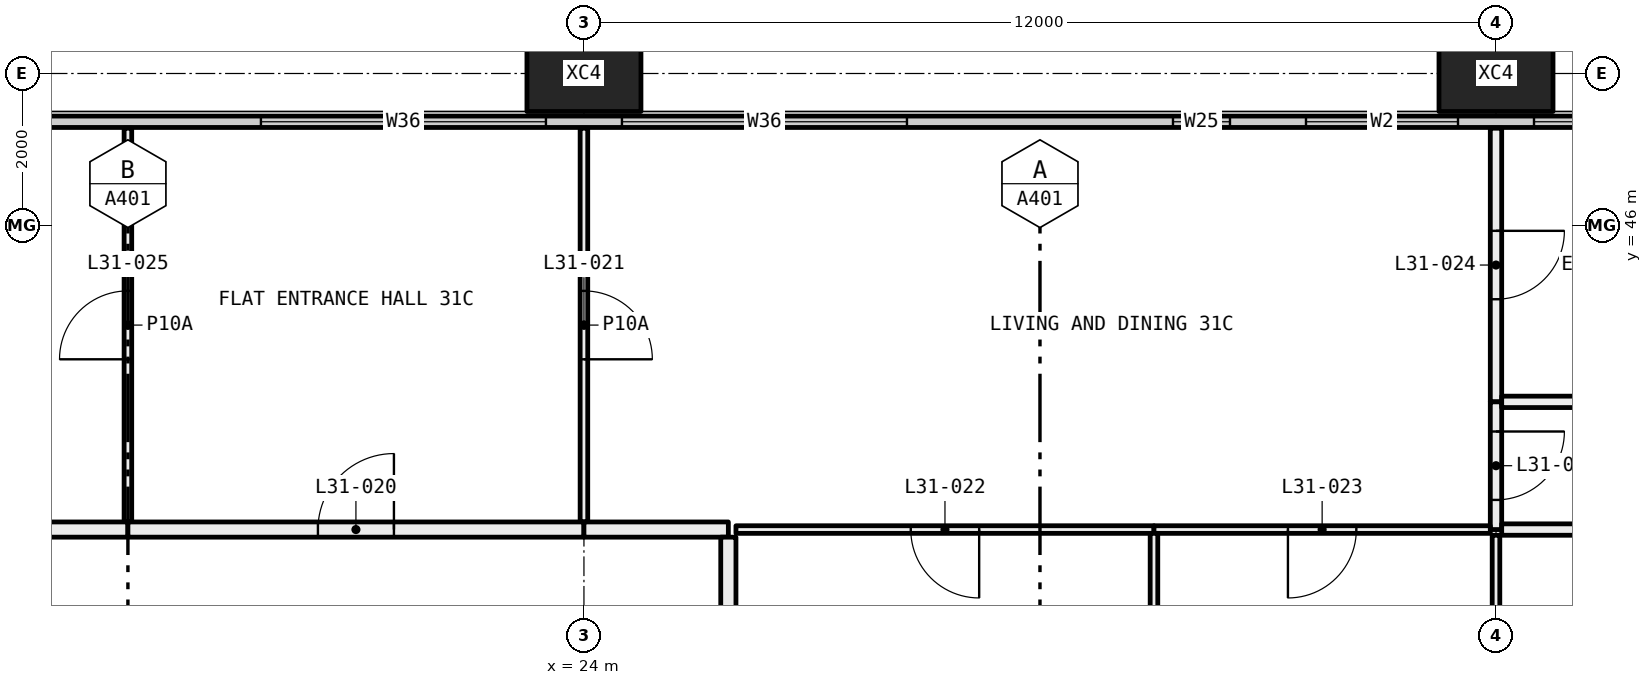
"""IFC4 building model, lengths in metres.
Left out: names, types, materials, properties, quantities, classifications, styles, units other than length and angle.
Written with IfcOpenShell. Run it as: python <this file> out.ifc"""

import sys

from ifc_helpers import new_model, si_unit, direction, frame, frame_2d, origin, origin_2d, place, context, subcontext, project, spatial, rectangle, hollow_rectangle, extrude, element, fill, save


model = new_model("IFC4")
c1 = context("Model", 3, precision=1e-05, world=origin(), true_north=direction((0.0, 1.0)))
c2 = subcontext(c1, "Body", "Model", "MODEL_VIEW")
j1 = project(units=[si_unit("LENGTHUNIT", "METRE"), si_unit("PLANEANGLEUNIT", "RADIAN")], contexts=[c1])
p1 = place(None, origin())
s1 = spatial("IfcSite", under=j1, at=p1, CompositionType="ELEMENT")
p2 = place(p1, origin())
s2 = spatial("IfcBuilding", under=s1, at=p2, CompositionType="ELEMENT")
p3 = place(p2, frame((0.0, 0.0, 120.75)))
s3 = spatial("IfcBuildingStorey", under=s2, at=p3, CompositionType="ELEMENT", Elevation=120.75)
for number, where, z_axis, x_axis in (
    (1, (24.0, 48.0, -0.4), (0.0, 0.0, 1.0), (1.0, 0.0, 0.0)),
    (2, (36.0, 48.0, -0.4), (0.0, 0.0, 1.0), (1.0, 0.0, 0.0)),
):
    element("IfcColumn", number, at=place(p3, frame(where, z_axis=z_axis, x_axis=x_axis)), inside=s3, PredefinedType="COLUMN", context=c2, shape_type="SweptSolid", body=[
        extrude(hollow_rectangle(XDim=1.5, YDim=1.0, WallThickness=0.06, at=origin_2d()), origin(), (0.0, 0.0, 1.0), 3.45),
    ])
p4 = place(p3, frame((6.56, 47.365, 0.0), z_axis=(0.0, 0.0, 1.0), x_axis=(1.0, 0.0, 0.0)))
e3 = element("IfcWall", 3, at=p4, inside=s3, PredefinedType="ELEMENTEDWALL", context=c2, shape_type="SweptSolid", body=[
    extrude(rectangle(XDim=58.88, YDim=0.15, at=frame_2d((29.44, 0.0))), origin(), (0.0, 0.0, 1.0), 3.05),
])
p5 = place(p4, frame((0.44, 0.0, 0.45)))
e4 = element("IfcOpeningElement", 4, at=p5, cuts=e3, PredefinedType="OPENING", context=c2, shape_type="SweptSolid", body=[
    extrude(rectangle(XDim=4.5, YDim=2.55, at=frame_2d((2.25, 1.275))), frame((0.0, 0.085, 0.0), z_axis=(0.0, -1.0, 0.0), x_axis=(1.0, 0.0, 0.0)), (0.0, 0.0, 1.0), 0.17),
])
p6 = place(p4, frame((5.94, 0.0, 0.45)))
e5 = element("IfcOpeningElement", 5, at=p6, cuts=e3, PredefinedType="OPENING", context=c2, shape_type="SweptSolid", body=[
    extrude(rectangle(XDim=3.75, YDim=2.55, at=frame_2d((1.875, 1.275))), frame((0.0, 0.085, 0.0), z_axis=(0.0, -1.0, 0.0), x_axis=(1.0, 0.0, 0.0)), (0.0, 0.0, 1.0), 0.17),
])
p7 = place(p4, frame((13.19, 0.0, 0.45)))
e6 = element("IfcOpeningElement", 6, at=p7, cuts=e3, PredefinedType="OPENING", context=c2, shape_type="SweptSolid", body=[
    extrude(rectangle(XDim=3.75, YDim=2.55, at=frame_2d((1.875, 1.275))), frame((0.0, 0.085, 0.0), z_axis=(0.0, -1.0, 0.0), x_axis=(1.0, 0.0, 0.0)), (0.0, 0.0, 1.0), 0.17),
])
p8 = place(p4, frame((17.94, 0.0, 0.45)))
e7 = element("IfcOpeningElement", 7, at=p8, cuts=e3, PredefinedType="OPENING", context=c2, shape_type="SweptSolid", body=[
    extrude(rectangle(XDim=3.75, YDim=2.55, at=frame_2d((1.875, 1.275))), frame((0.0, 0.085, 0.0), z_axis=(0.0, -1.0, 0.0), x_axis=(1.0, 0.0, 0.0)), (0.0, 0.0, 1.0), 0.17),
])
p9 = place(p4, frame((25.19, 0.0, 0.45)))
e8 = element("IfcOpeningElement", 8, at=p9, cuts=e3, PredefinedType="OPENING", context=c2, shape_type="SweptSolid", body=[
    extrude(rectangle(XDim=0.75, YDim=2.55, at=frame_2d((0.375, 1.275))), frame((0.0, 0.085, 0.0), z_axis=(0.0, -1.0, 0.0), x_axis=(1.0, 0.0, 0.0)), (0.0, 0.0, 1.0), 0.17),
])
p10 = place(p4, frame((26.94, 0.0, 0.45)))
e9 = element("IfcOpeningElement", 9, at=p10, cuts=e3, PredefinedType="OPENING", context=c2, shape_type="SweptSolid", body=[
    extrude(rectangle(XDim=2.0, YDim=2.55, at=frame_2d((1.0, 1.275))), frame((0.0, 0.085, 0.0), z_axis=(0.0, -1.0, 0.0), x_axis=(1.0, 0.0, 0.0)), (0.0, 0.0, 1.0), 0.17),
])
p11 = place(p4, frame((29.94, 0.0, 0.45)))
e10 = element("IfcOpeningElement", 10, at=p11, cuts=e3, PredefinedType="OPENING", context=c2, shape_type="SweptSolid", body=[
    extrude(rectangle(XDim=3.75, YDim=2.55, at=frame_2d((1.875, 1.275))), frame((0.0, 0.085, 0.0), z_axis=(0.0, -1.0, 0.0), x_axis=(1.0, 0.0, 0.0)), (0.0, 0.0, 1.0), 0.17),
])
p12 = place(p4, frame((37.19, 0.0, 0.45)))
e11 = element("IfcOpeningElement", 11, at=p12, cuts=e3, PredefinedType="OPENING", context=c2, shape_type="SweptSolid", body=[
    extrude(rectangle(XDim=3.75, YDim=2.55, at=frame_2d((1.875, 1.275))), frame((0.0, 0.085, 0.0), z_axis=(0.0, -1.0, 0.0), x_axis=(1.0, 0.0, 0.0)), (0.0, 0.0, 1.0), 0.17),
])
p13 = place(p4, frame((41.94, 0.0, 0.45)))
e12 = element("IfcOpeningElement", 12, at=p13, cuts=e3, PredefinedType="OPENING", context=c2, shape_type="SweptSolid", body=[
    extrude(rectangle(XDim=3.75, YDim=2.55, at=frame_2d((1.875, 1.275))), frame((0.0, 0.085, 0.0), z_axis=(0.0, -1.0, 0.0), x_axis=(1.0, 0.0, 0.0)), (0.0, 0.0, 1.0), 0.17),
])
p14 = place(p4, frame((49.19, 0.0, 0.45)))
e13 = element("IfcOpeningElement", 13, at=p14, cuts=e3, PredefinedType="OPENING", context=c2, shape_type="SweptSolid", body=[
    extrude(rectangle(XDim=0.75, YDim=2.55, at=frame_2d((0.375, 1.275))), frame((0.0, 0.085, 0.0), z_axis=(0.0, -1.0, 0.0), x_axis=(1.0, 0.0, 0.0)), (0.0, 0.0, 1.0), 0.17),
])
p15 = place(p4, frame((50.94, 0.0, 0.45)))
e14 = element("IfcOpeningElement", 14, at=p15, cuts=e3, PredefinedType="OPENING", context=c2, shape_type="SweptSolid", body=[
    extrude(rectangle(XDim=2.0, YDim=2.55, at=frame_2d((1.0, 1.275))), frame((0.0, 0.085, 0.0), z_axis=(0.0, -1.0, 0.0), x_axis=(1.0, 0.0, 0.0)), (0.0, 0.0, 1.0), 0.17),
])
p16 = place(p4, frame((53.94, 0.0, 0.45)))
e15 = element("IfcOpeningElement", 15, at=p16, cuts=e3, PredefinedType="OPENING", context=c2, shape_type="SweptSolid", body=[
    extrude(rectangle(XDim=4.5, YDim=2.55, at=frame_2d((2.25, 1.275))), frame((0.0, 0.085, 0.0), z_axis=(0.0, -1.0, 0.0), x_axis=(1.0, 0.0, 0.0)), (0.0, 0.0, 1.0), 0.17),
])
p17 = place(p3, frame((18.0, 42.1, 0.0), z_axis=(0.0, 0.0, 1.0), x_axis=(0.0, 1.0, 0.0)))
e16 = element("IfcWall", 16, at=p17, inside=s3, PredefinedType="PARTITIONING", context=c2, shape_type="SweptSolid", body=[
    extrude(rectangle(XDim=5.18, YDim=0.1, at=frame_2d((2.59, 0.0))), origin(), (0.0, 0.0, 1.0), 3.05),
])
p18 = place(p17, frame((2.14, 0.0, 0.0)))
e17 = element("IfcOpeningElement", 17, at=p18, cuts=e16, PredefinedType="OPENING", context=c2, shape_type="SweptSolid", body=[
    extrude(rectangle(XDim=0.9, YDim=2.1, at=frame_2d((0.45, 1.05))), frame((0.0, 0.06, 0.0), z_axis=(0.0, -1.0, 0.0), x_axis=(1.0, 0.0, 0.0)), (0.0, 0.0, 1.0), 0.12),
])
p19 = place(p3, frame((12.0, 42.0, 0.0), z_axis=(0.0, 0.0, 1.0), x_axis=(1.0, 0.0, 0.0)))
e18 = element("IfcWall", 18, at=p19, inside=s3, PredefinedType="PARTITIONING", context=c2, shape_type="SweptSolid", body=[
    extrude(rectangle(XDim=6.0, YDim=0.2, at=frame_2d((3.0, 0.0))), origin(), (0.0, 0.0, 1.0), 3.05),
])
p20 = place(p3, frame((24.0, 42.1, 0.0), z_axis=(0.0, 0.0, 1.0), x_axis=(0.0, 1.0, 0.0)))
e19 = element("IfcWall", 19, at=p20, inside=s3, PredefinedType="PARTITIONING", context=c2, shape_type="SweptSolid", body=[
    extrude(rectangle(XDim=5.18, YDim=0.1, at=frame_2d((2.59, 0.0))), origin(), (0.0, 0.0, 1.0), 3.05),
])
p21 = place(p20, frame((2.14, 0.0, 0.0)))
e20 = element("IfcOpeningElement", 20, at=p21, cuts=e19, PredefinedType="OPENING", context=c2, shape_type="SweptSolid", body=[
    extrude(rectangle(XDim=0.9, YDim=2.1, at=frame_2d((0.45, 1.05))), frame((0.0, 0.06, 0.0), z_axis=(0.0, -1.0, 0.0), x_axis=(1.0, 0.0, 0.0)), (0.0, 0.0, 1.0), 0.12),
])
p22 = place(p3, frame((18.0, 42.0, 0.0), z_axis=(0.0, 0.0, 1.0), x_axis=(1.0, 0.0, 0.0)))
e21 = element("IfcWall", 21, at=p22, inside=s3, PredefinedType="PARTITIONING", context=c2, shape_type="SweptSolid", body=[
    extrude(rectangle(XDim=6.0, YDim=0.2, at=frame_2d((3.0, 0.0))), origin(), (0.0, 0.0, 1.0), 3.05),
])
p23 = place(p22, frame((2.5, 0.0, 0.0)))
e22 = element("IfcOpeningElement", 22, at=p23, cuts=e21, PredefinedType="OPENING", context=c2, shape_type="SweptSolid", body=[
    extrude(rectangle(XDim=1.0, YDim=2.1, at=frame_2d((0.5, 1.05))), frame((0.0, 0.11, 0.0), z_axis=(0.0, -1.0, 0.0), x_axis=(1.0, 0.0, 0.0)), (0.0, 0.0, 1.0), 0.22),
])
p24 = place(p3, frame((36.0, 43.68, 0.0), z_axis=(0.0, 0.0, 1.0), x_axis=(0.0, 1.0, 0.0)))
e23 = element("IfcWall", 23, at=p24, inside=s3, PredefinedType="PARTITIONING", context=c2, shape_type="SweptSolid", body=[
    extrude(rectangle(XDim=3.6, YDim=0.15, at=frame_2d((1.8, 0.0))), origin(), (0.0, 0.0, 1.0), 2.45),
])
p25 = place(p24, frame((1.35, 0.0, 0.0)))
e24 = element("IfcOpeningElement", 24, at=p25, cuts=e23, PredefinedType="OPENING", context=c2, shape_type="SweptSolid", body=[
    extrude(rectangle(XDim=0.9, YDim=2.1, at=frame_2d((0.45, 1.05))), frame((0.0, 0.085, 0.0), z_axis=(0.0, -1.0, 0.0), x_axis=(1.0, 0.0, 0.0)), (0.0, 0.0, 1.0), 0.17),
])
p26 = place(p3, frame((36.0, 42.0, 0.0), z_axis=(0.0, 0.0, 1.0), x_axis=(0.0, 1.0, 0.0)))
e25 = element("IfcWall", 25, at=p26, inside=s3, PredefinedType="PARTITIONING", context=c2, shape_type="SweptSolid", body=[
    extrude(rectangle(XDim=1.68, YDim=0.15, at=frame_2d((0.84, 0.0))), origin(), (0.0, 0.0, 1.0), 2.45),
])
p27 = place(p26, frame((0.39, 0.0, 0.0)))
e26 = element("IfcOpeningElement", 26, at=p27, cuts=e25, PredefinedType="OPENING", context=c2, shape_type="SweptSolid", body=[
    extrude(rectangle(XDim=0.9, YDim=2.1, at=frame_2d((0.45, 1.05))), frame((0.0, 0.085, 0.0), z_axis=(0.0, -1.0, 0.0), x_axis=(1.0, 0.0, 0.0)), (0.0, 0.0, 1.0), 0.17),
])
p28 = place(p3, frame((26.0, 42.0, 0.0), z_axis=(0.0, 0.0, 1.0), x_axis=(1.0, 0.0, 0.0)))
e27 = element("IfcWall", 27, at=p28, inside=s3, PredefinedType="PARTITIONING", context=c2, shape_type="SweptSolid", body=[
    extrude(rectangle(XDim=5.5, YDim=0.1, at=frame_2d((2.75, 0.0))), origin(), (0.0, 0.0, 1.0), 3.05),
])
p29 = place(p28, frame((2.3, 0.0, 0.0)))
e28 = element("IfcOpeningElement", 28, at=p29, cuts=e27, PredefinedType="OPENING", context=c2, shape_type="SweptSolid", body=[
    extrude(rectangle(XDim=0.9, YDim=2.1, at=frame_2d((0.45, 1.05))), frame((0.0, 0.06, 0.0), z_axis=(0.0, -1.0, 0.0), x_axis=(1.0, 0.0, 0.0)), (0.0, 0.0, 1.0), 0.12),
])
p30 = place(p3, frame((31.5, 42.0, 0.0), z_axis=(0.0, 0.0, 1.0), x_axis=(1.0, 0.0, 0.0)))
e29 = element("IfcWall", 29, at=p30, inside=s3, PredefinedType="PARTITIONING", context=c2, shape_type="SweptSolid", body=[
    extrude(rectangle(XDim=4.425, YDim=0.1, at=frame_2d((2.212, 0.0))), origin(), (0.0, 0.0, 1.0), 2.45),
])
p31 = place(p30, frame((1.762, 0.0, 0.0)))
e30 = element("IfcOpeningElement", 30, at=p31, cuts=e29, PredefinedType="OPENING", context=c2, shape_type="SweptSolid", body=[
    extrude(rectangle(XDim=0.9, YDim=2.1, at=frame_2d((0.45, 1.05))), frame((0.0, 0.06, 0.0), z_axis=(0.0, -1.0, 0.0), x_axis=(1.0, 0.0, 0.0)), (0.0, 0.0, 1.0), 0.12),
])
p32 = place(p3, frame((24.0, 42.0, 0.0), z_axis=(0.0, 0.0, 1.0), x_axis=(1.0, 0.0, 0.0)))
e31 = element("IfcWall", 31, at=p32, inside=s3, PredefinedType="PARTITIONING", context=c2, shape_type="SweptSolid", body=[
    extrude(rectangle(XDim=1.9, YDim=0.2, at=frame_2d((0.95, 0.0))), origin(), (0.0, 0.0, 1.0), 3.05),
])
for number, where, z_axis, x_axis in (
    (32, (36.075, 43.68, 0.0), (0.0, 0.0, 1.0), (1.0, 0.0, 0.0)),
    (33, (36.075, 42.0, 0.0), (0.0, 0.0, 1.0), (1.0, 0.0, 0.0)),
):
    element("IfcWall", number, at=place(p3, frame(where, z_axis=z_axis, x_axis=x_axis)), inside=s3, PredefinedType="PARTITIONING", context=c2, shape_type="SweptSolid", body=[
        extrude(rectangle(XDim=5.825, YDim=0.15, at=frame_2d((2.913, 0.0))), origin(), (0.0, 0.0, 1.0), 2.45),
    ])
p33 = place(p3, frame((31.5, 36.1, 0.0), z_axis=(0.0, 0.0, 1.0), x_axis=(0.0, 1.0, 0.0)))
e34 = element("IfcWall", 34, at=p33, inside=s3, PredefinedType="PARTITIONING", context=c2, shape_type="SweptSolid", body=[
    extrude(rectangle(XDim=5.85, YDim=0.1, at=frame_2d((2.925, 0.0))), origin(), (0.0, 0.0, 1.0), 3.05),
])
p34 = place(p3, frame((25.9, 41.9, 0.0), z_axis=(0.0, 0.0, 1.0), x_axis=(0.0, -1.0, 0.0)))
e35 = element("IfcWall", 35, at=p34, inside=s3, PredefinedType="PARTITIONING", context=c2, shape_type="SweptSolid", body=[
    extrude(rectangle(XDim=6.2, YDim=0.2, at=frame_2d((3.1, 0.0))), origin(), (0.0, 0.0, 1.0), 2.45),
])
p35 = place(p3, frame((36.0, 36.75, 0.0), z_axis=(0.0, 0.0, 1.0), x_axis=(0.0, 1.0, 0.0)))
e36 = element("IfcWall", 36, at=p35, inside=s3, PredefinedType="PARTITIONING", context=c2, shape_type="SweptSolid", body=[
    extrude(rectangle(XDim=5.175, YDim=0.1, at=frame_2d((2.587, 0.0))), origin(), (0.0, 0.0, 1.0), 2.45),
])
p36 = place(p35, frame((2.137, 0.0, 0.0)))
e37 = element("IfcOpeningElement", 37, at=p36, cuts=e36, PredefinedType="OPENING", context=c2, shape_type="SweptSolid", body=[
    extrude(rectangle(XDim=0.9, YDim=2.1, at=frame_2d((0.45, 1.05))), frame((0.0, 0.06, 0.0), z_axis=(0.0, -1.0, 0.0), x_axis=(1.0, 0.0, 0.0)), (0.0, 0.0, 1.0), 0.12),
])
p37 = place(p7, origin())
e38 = element("IfcWindow", 38, at=p37, inside=s3, PartitioningType="SINGLE_PANEL", PredefinedType="WINDOW", context=c2, shape_type="SweptSolid", body=[
    extrude(rectangle(XDim=3.75, YDim=2.55, at=frame_2d((1.875, 1.275))), frame((0.0, 0.03, 0.0), z_axis=(0.0, -1.0, 0.0), x_axis=(1.0, 0.0, 0.0)), (0.0, 0.0, 1.0), 0.06),
])
fill(e6, e38)
p38 = place(p8, origin())
e39 = element("IfcWindow", 39, at=p38, inside=s3, PartitioningType="SINGLE_PANEL", PredefinedType="WINDOW", context=c2, shape_type="SweptSolid", body=[
    extrude(rectangle(XDim=3.75, YDim=2.55, at=frame_2d((1.875, 1.275))), frame((0.0, 0.03, 0.0), z_axis=(0.0, -1.0, 0.0), x_axis=(1.0, 0.0, 0.0)), (0.0, 0.0, 1.0), 0.06),
])
fill(e7, e39)
p39 = place(p9, origin())
e40 = element("IfcWindow", 40, at=p39, inside=s3, PartitioningType="SINGLE_PANEL", PredefinedType="WINDOW", context=c2, shape_type="SweptSolid", body=[
    extrude(rectangle(XDim=0.75, YDim=2.55, at=frame_2d((0.375, 1.275))), frame((0.0, 0.03, 0.0), z_axis=(0.0, -1.0, 0.0), x_axis=(1.0, 0.0, 0.0)), (0.0, 0.0, 1.0), 0.06),
])
fill(e8, e40)
p40 = place(p10, origin())
e41 = element("IfcWindow", 41, at=p40, inside=s3, PartitioningType="SINGLE_PANEL", PredefinedType="WINDOW", context=c2, shape_type="SweptSolid", body=[
    extrude(rectangle(XDim=2.0, YDim=2.55, at=frame_2d((1.0, 1.275))), frame((0.0, 0.03, 0.0), z_axis=(0.0, -1.0, 0.0), x_axis=(1.0, 0.0, 0.0)), (0.0, 0.0, 1.0), 0.06),
])
fill(e9, e41)
p41 = place(p11, origin())
e42 = element("IfcWindow", 42, at=p41, inside=s3, PartitioningType="SINGLE_PANEL", PredefinedType="WINDOW", context=c2, shape_type="SweptSolid", body=[
    extrude(rectangle(XDim=3.75, YDim=2.55, at=frame_2d((1.875, 1.275))), frame((0.0, 0.03, 0.0), z_axis=(0.0, -1.0, 0.0), x_axis=(1.0, 0.0, 0.0)), (0.0, 0.0, 1.0), 0.06),
])
fill(e10, e42)
p42 = place(p23, origin())
e43 = element("IfcDoor", 43, at=p42, inside=s3, OperationType="SINGLE_SWING_LEFT", PredefinedType="DOOR", context=c2, shape_type="SweptSolid", body=[
    extrude(rectangle(XDim=1.0, YDim=2.1, at=frame_2d((0.5, 1.05))), frame((0.0, 0.025, 0.0), z_axis=(0.0, -1.0, 0.0), x_axis=(1.0, 0.0, 0.0)), (0.0, 0.0, 1.0), 0.05),
])
fill(e22, e43)
p43 = place(p21, frame((0.9, 0.0, 0.0), x_axis=(-1.0, 0.0, 0.0)))
e44 = element("IfcDoor", 44, at=p43, inside=s3, OperationType="SINGLE_SWING_LEFT", PredefinedType="DOOR", context=c2, shape_type="SweptSolid", body=[
    extrude(rectangle(XDim=0.9, YDim=2.1, at=frame_2d((0.45, 1.05))), frame((0.0, 0.025, 0.0), z_axis=(0.0, -1.0, 0.0), x_axis=(1.0, 0.0, 0.0)), (0.0, 0.0, 1.0), 0.05),
])
fill(e20, e44)
p44 = place(p29, frame((0.9, 0.0, 0.0), x_axis=(-1.0, 0.0, 0.0)))
e45 = element("IfcDoor", 45, at=p44, inside=s3, OperationType="SINGLE_SWING_RIGHT", PredefinedType="DOOR", context=c2, shape_type="SweptSolid", body=[
    extrude(rectangle(XDim=0.9, YDim=2.1, at=frame_2d((0.45, 1.05))), frame((0.0, 0.025, 0.0), z_axis=(0.0, -1.0, 0.0), x_axis=(1.0, 0.0, 0.0)), (0.0, 0.0, 1.0), 0.05),
])
fill(e28, e45)
p45 = place(p31, frame((0.9, 0.0, 0.0), x_axis=(-1.0, 0.0, 0.0)))
e46 = element("IfcDoor", 46, at=p45, inside=s3, OperationType="SINGLE_SWING_LEFT", PredefinedType="DOOR", context=c2, shape_type="SweptSolid", body=[
    extrude(rectangle(XDim=0.9, YDim=2.1, at=frame_2d((0.45, 1.05))), frame((0.0, 0.025, 0.0), z_axis=(0.0, -1.0, 0.0), x_axis=(1.0, 0.0, 0.0)), (0.0, 0.0, 1.0), 0.05),
])
fill(e30, e46)
p46 = place(p25, frame((0.9, 0.0, 0.0), x_axis=(-1.0, 0.0, 0.0)))
e47 = element("IfcDoor", 47, at=p46, inside=s3, OperationType="SINGLE_SWING_RIGHT", PredefinedType="DOOR", context=c2, shape_type="SweptSolid", body=[
    extrude(rectangle(XDim=0.9, YDim=2.1, at=frame_2d((0.45, 1.05))), frame((0.0, 0.025, 0.0), z_axis=(0.0, -1.0, 0.0), x_axis=(1.0, 0.0, 0.0)), (0.0, 0.0, 1.0), 0.05),
])
fill(e24, e47)
p47 = place(p18, origin())
e48 = element("IfcDoor", 48, at=p47, inside=s3, OperationType="SINGLE_SWING_RIGHT", PredefinedType="DOOR", context=c2, shape_type="SweptSolid", body=[
    extrude(rectangle(XDim=0.9, YDim=2.1, at=frame_2d((0.45, 1.05))), frame((0.0, 0.025, 0.0), z_axis=(0.0, -1.0, 0.0), x_axis=(1.0, 0.0, 0.0)), (0.0, 0.0, 1.0), 0.05),
])
fill(e17, e48)
p48 = place(p27, frame((0.9, 0.0, 0.0), x_axis=(-1.0, 0.0, 0.0)))
e49 = element("IfcDoor", 49, at=p48, inside=s3, OperationType="SINGLE_SWING_RIGHT", PredefinedType="DOOR", context=c2, shape_type="SweptSolid", body=[
    extrude(rectangle(XDim=0.9, YDim=2.1, at=frame_2d((0.45, 1.05))), frame((0.0, 0.025, 0.0), z_axis=(0.0, -1.0, 0.0), x_axis=(1.0, 0.0, 0.0)), (0.0, 0.0, 1.0), 0.05),
])
fill(e26, e49)
save(model, sys.argv[1])
